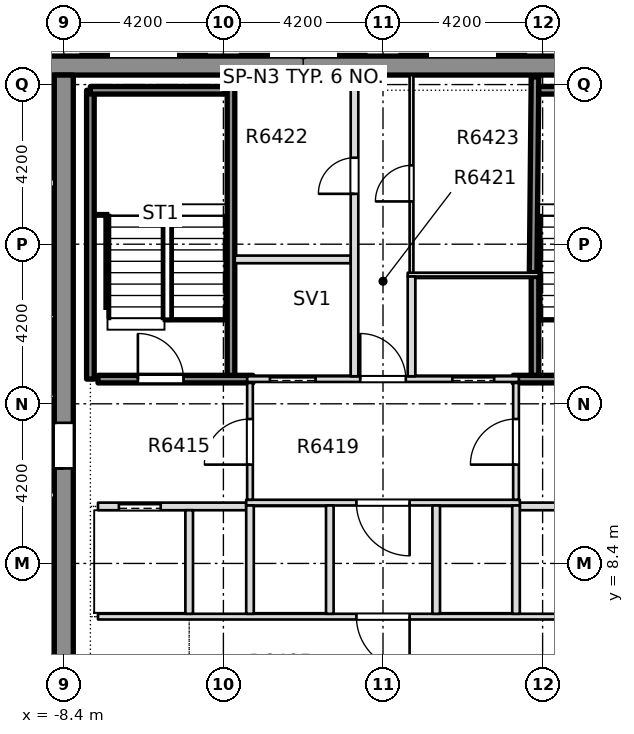
"""IFC4 building model, lengths in metres.
Left out: names, types, materials, properties, quantities, classifications, styles, units other than length and angle.
Written with IfcOpenShell. Run it as: python <this file> out.ifc"""

import sys

from ifc_helpers import new_model, si_unit, direction, frame, frame_2d, origin, place, context, subcontext, project, spatial, rectangle, extrude, element, fill, save


model = new_model("IFC4")
c1 = context("Model", 3, precision=1e-05, world=origin(), true_north=direction((0.0, 1.0)))
c2 = subcontext(c1, "Body", "Model", "MODEL_VIEW")
j1 = project(units=[si_unit("LENGTHUNIT", "METRE"), si_unit("PLANEANGLEUNIT", "RADIAN")], contexts=[c1])
p1 = place(None, origin())
s1 = spatial("IfcSite", under=j1, at=p1, CompositionType="ELEMENT")
p2 = place(p1, origin())
s2 = spatial("IfcBuilding", under=s1, at=p2, CompositionType="ELEMENT")
p3 = place(p2, frame((0.0, 0.0, 244.15)))
s3 = spatial("IfcBuildingStorey", under=s2, at=p3, CompositionType="ELEMENT", Elevation=244.15)
p4 = place(p3, frame((-12.1, 21.5, -0.4), z_axis=(0.0, 0.0, 1.0), x_axis=(1.0, 0.0, 0.0)))
e1 = element("IfcWall", 1, at=p4, inside=s3, PredefinedType="SHEAR", context=c2, shape_type="SweptSolid", body=[
    extrude(rectangle(XDim=24.2, YDim=0.5, at=frame_2d((12.1, 0.0))), origin(), (0.0, 0.0, 1.0), 3.45),
])
p5 = place(p3, frame((-8.4, -7.9, -0.4), z_axis=(0.0, 0.0, 1.0), x_axis=(0.0, 1.0, 0.0)))
e2 = element("IfcWall", 2, at=p5, inside=s3, PredefinedType="SHEAR", context=c2, shape_type="SweptSolid", body=[
    extrude(rectangle(XDim=29.15, YDim=0.5, at=frame_2d((14.575, 0.0))), origin(), (0.0, 0.0, 1.0), 3.45),
])
p6 = place(p5, frame((18.8, 0.0, 0.4)))
e3 = element("IfcOpeningElement", 3, at=p6, cuts=e2, PredefinedType="OPENING", context=c2, shape_type="SweptSolid", body=[
    extrude(rectangle(XDim=1.2, YDim=2.1, at=frame_2d((0.6, 1.05))), frame((0.0, 0.26, 0.0), z_axis=(0.0, -1.0, 0.0), x_axis=(1.0, 0.0, 0.0)), (0.0, 0.0, 1.0), 0.52),
])
p7 = place(p3, frame((-7.5, 7.0, 0.0), z_axis=(0.0, 0.0, 1.0), x_axis=(1.0, 0.0, 0.0)))
e4 = element("IfcWall", 4, at=p7, inside=s3, PredefinedType="PARTITIONING", context=c2, shape_type="SweptSolid", body=[
    extrude(rectangle(XDim=15.0, YDim=0.15, at=frame_2d((7.5, 0.0))), origin(), (0.0, 0.0, 1.0), 3.05),
])
p8 = place(p7, frame((6.8, 0.0, 0.0)))
e5 = element("IfcOpeningElement", 5, at=p8, cuts=e4, PredefinedType="OPENING", context=c2, shape_type="SweptSolid", body=[
    extrude(rectangle(XDim=1.4, YDim=2.1, at=frame_2d((0.7, 1.05))), frame((0.0, 0.085, 0.0), z_axis=(0.0, -1.0, 0.0), x_axis=(1.0, 0.0, 0.0)), (0.0, 0.0, 1.0), 0.17),
])
p9 = place(p3, frame((-7.5, 9.9, 0.0), z_axis=(0.0, 0.0, 1.0), x_axis=(1.0, 0.0, 0.0)))
e6 = element("IfcWall", 6, at=p9, inside=s3, PredefinedType="PARTITIONING", context=c2, shape_type="SweptSolid", body=[
    extrude(rectangle(XDim=3.9, YDim=0.2, at=frame_2d((1.95, 0.0))), origin(), (0.0, 0.0, 1.0), 3.05),
])
p10 = place(p9, frame((0.55, 0.0, 0.0)))
e7 = element("IfcOpeningElement", 7, at=p10, cuts=e6, PredefinedType="OPENING", context=c2, shape_type="SweptSolid", body=[
    extrude(rectangle(XDim=1.1, YDim=2.1, at=frame_2d((0.55, 1.05))), frame((0.0, 0.11, 0.0), z_axis=(0.0, -1.0, 0.0), x_axis=(1.0, 0.0, 0.0)), (0.0, 0.0, 1.0), 0.22),
])
p11 = place(p3, frame((3.6, 9.9, 0.0), z_axis=(0.0, 0.0, 1.0), x_axis=(1.0, 0.0, 0.0)))
e8 = element("IfcWall", 8, at=p11, inside=s3, PredefinedType="PARTITIONING", context=c2, shape_type="SweptSolid", body=[
    extrude(rectangle(XDim=3.9, YDim=0.2, at=frame_2d((1.95, 0.0))), origin(), (0.0, 0.0, 1.0), 3.05),
])
p12 = place(p11, frame((2.25, 0.0, 0.0)))
e9 = element("IfcOpeningElement", 9, at=p12, cuts=e8, PredefinedType="OPENING", context=c2, shape_type="SweptSolid", body=[
    extrude(rectangle(XDim=1.1, YDim=2.1, at=frame_2d((0.55, 1.05))), frame((0.0, 0.11, 0.0), z_axis=(0.0, -1.0, 0.0), x_axis=(1.0, 0.0, 0.0)), (0.0, 0.0, 1.0), 0.22),
])
p13 = place(p3, frame((-3.6, 10.0, 0.0), z_axis=(0.0, 0.0, 1.0), x_axis=(1.0, 0.0, 0.0)))
e10 = element("IfcWall", 10, at=p13, inside=s3, PredefinedType="PARTITIONING", context=c2, shape_type="SweptSolid", body=[
    extrude(rectangle(XDim=7.2, YDim=0.15, at=frame_2d((3.6, 0.0))), origin(), (0.0, 0.0, 1.0), 3.05),
])
p14 = place(p13, frame((2.9, 0.0, 0.0)))
e11 = element("IfcOpeningElement", 11, at=p14, cuts=e10, PredefinedType="OPENING", context=c2, shape_type="SweptSolid", body=[
    extrude(rectangle(XDim=1.4, YDim=2.1, at=frame_2d((0.7, 1.05))), frame((0.0, 0.085, 0.0), z_axis=(0.0, -1.0, 0.0), x_axis=(1.0, 0.0, 0.0)), (0.0, 0.0, 1.0), 0.17),
])
p15 = place(p3, frame((-7.5, 13.25, 0.0), z_axis=(0.0, 0.0, 1.0), x_axis=(1.0, 0.0, 0.0)))
e12 = element("IfcWall", 12, at=p15, inside=s3, PredefinedType="SOLIDWALL", context=c2, shape_type="SweptSolid", body=[
    extrude(rectangle(XDim=4.075, YDim=0.2, at=frame_2d((2.038, 0.0))), origin(), (0.0, 0.0, 1.0), 3.05),
])
p16 = place(p15, frame((1.05, 0.0, 0.0)))
e13 = element("IfcOpeningElement", 13, at=p16, cuts=e12, PredefinedType="OPENING", context=c2, shape_type="SweptSolid", body=[
    extrude(rectangle(XDim=1.2, YDim=2.1, at=frame_2d((0.6, 1.05))), frame((0.0, 0.11, 0.0), z_axis=(0.0, -1.0, 0.0), x_axis=(1.0, 0.0, 0.0)), (0.0, 0.0, 1.0), 0.22),
])
p17 = place(p3, frame((-3.575, 13.25, 0.0), z_axis=(0.0, 0.0, 1.0), x_axis=(1.0, 0.0, 0.0)))
e14 = element("IfcWall", 14, at=p17, inside=s3, PredefinedType="PARTITIONING", context=c2, shape_type="SweptSolid", body=[
    extrude(rectangle(XDim=7.15, YDim=0.15, at=frame_2d((3.575, 0.0))), origin(), (0.0, 0.0, 1.0), 3.05),
])
p18 = place(p17, frame((0.6, 0.0, 0.0)))
e15 = element("IfcOpeningElement", 15, at=p18, cuts=e14, PredefinedType="OPENING", context=c2, shape_type="SweptSolid", body=[
    extrude(rectangle(XDim=1.2, YDim=2.1, at=frame_2d((0.6, 1.05))), frame((0.0, 0.085, 0.0), z_axis=(0.0, -1.0, 0.0), x_axis=(1.0, 0.0, 0.0)), (0.0, 0.0, 1.0), 0.17),
])
p19 = place(p17, frame((5.4, 0.0, 0.0)))
e16 = element("IfcOpeningElement", 16, at=p19, cuts=e14, PredefinedType="OPENING", context=c2, shape_type="SweptSolid", body=[
    extrude(rectangle(XDim=1.1, YDim=2.1, at=frame_2d((0.55, 1.05))), frame((0.0, 0.085, 0.0), z_axis=(0.0, -1.0, 0.0), x_axis=(1.0, 0.0, 0.0)), (0.0, 0.0, 1.0), 0.17),
])
p20 = place(p17, frame((2.975, 0.0, 0.0)))
e17 = element("IfcOpeningElement", 17, at=p20, cuts=e14, PredefinedType="OPENING", context=c2, shape_type="SweptSolid", body=[
    extrude(rectangle(XDim=1.2, YDim=2.1, at=frame_2d((0.6, 1.05))), frame((0.0, 0.085, 0.0), z_axis=(0.0, -1.0, 0.0), x_axis=(1.0, 0.0, 0.0)), (0.0, 0.0, 1.0), 0.17),
])
p21 = place(p3, frame((3.425, 13.25, 0.0), z_axis=(0.0, 0.0, 1.0), x_axis=(1.0, 0.0, 0.0)))
e18 = element("IfcWall", 18, at=p21, inside=s3, PredefinedType="SOLIDWALL", context=c2, shape_type="SweptSolid", body=[
    extrude(rectangle(XDim=4.075, YDim=0.2, at=frame_2d((2.038, 0.0))), origin(), (0.0, 0.0, 1.0), 3.05),
])
p22 = place(p21, frame((1.825, 0.0, 0.0)))
e19 = element("IfcOpeningElement", 19, at=p22, cuts=e18, PredefinedType="OPENING", context=c2, shape_type="SweptSolid", body=[
    extrude(rectangle(XDim=1.2, YDim=2.1, at=frame_2d((0.6, 1.05))), frame((0.0, 0.11, 0.0), z_axis=(0.0, -1.0, 0.0), x_axis=(1.0, 0.0, 0.0)), (0.0, 0.0, 1.0), 0.22),
])
p23 = place(p3, frame((0.65, 16.0, 0.0), z_axis=(0.0, 0.0, 1.0), x_axis=(1.0, 0.0, 0.0)))
e20 = element("IfcWall", 20, at=p23, inside=s3, PredefinedType="PARTITIONING", context=c2, shape_type="SweptSolid", body=[
    extrude(rectangle(XDim=3.45, YDim=0.1, at=frame_2d((1.725, 0.0))), origin(), (0.0, 0.0, 1.0), 3.05),
])
p24 = place(p3, frame((-3.9, 16.4, 0.0), z_axis=(0.0, 0.0, 1.0), x_axis=(1.0, 0.0, 0.0)))
e21 = element("IfcWall", 21, at=p24, inside=s3, PredefinedType="PARTITIONING", context=c2, shape_type="SweptSolid", body=[
    extrude(rectangle(XDim=3.05, YDim=0.2, at=frame_2d((1.525, 0.0))), origin(), (0.0, 0.0, 1.0), 3.05),
])
p25 = place(p3, frame((-5.1, 7.075, 0.0), z_axis=(0.0, 0.0, 1.0), x_axis=(0.0, 1.0, 0.0)))
e22 = element("IfcWall", 22, at=p25, inside=s3, PredefinedType="PARTITIONING", context=c2, shape_type="SweptSolid", body=[
    extrude(rectangle(XDim=2.725, YDim=0.2, at=frame_2d((1.363, 0.0))), origin(), (0.0, 0.0, 1.0), 3.05),
])
p26 = place(p3, frame((-4.0, 13.35, 0.0), z_axis=(0.0, 0.0, 1.0), x_axis=(0.0, 1.0, 0.0)))
e23 = element("IfcWall", 23, at=p26, inside=s3, PredefinedType="SOLIDWALL", context=c2, shape_type="SweptSolid", body=[
    extrude(rectangle(XDim=7.899, YDim=0.2, at=frame_2d((3.949, 0.0))), origin(), (0.0, 0.0, 1.0), 3.05),
])
p27 = place(p3, frame((-3.5, 7.075, 0.0), z_axis=(0.0, 0.0, 1.0), x_axis=(0.0, 1.0, 0.0)))
e24 = element("IfcWall", 24, at=p27, inside=s3, PredefinedType="PARTITIONING", context=c2, shape_type="SweptSolid", body=[
    extrude(rectangle(XDim=2.85, YDim=0.2, at=frame_2d((1.425, 0.0))), origin(), (0.0, 0.0, 1.0), 3.05),
])
p28 = place(p3, frame((-3.5, 10.075, 0.0), z_axis=(0.0, 0.0, 1.0), x_axis=(0.0, 1.0, 0.0)))
e25 = element("IfcWall", 25, at=p28, inside=s3, PredefinedType="PARTITIONING", context=c2, shape_type="SweptSolid", body=[
    extrude(rectangle(XDim=3.075, YDim=0.15, at=frame_2d((1.538, 0.0))), origin(), (0.0, 0.0, 1.0), 3.05),
])
p29 = place(p28, frame((0.925, 0.0, 0.0)))
e26 = element("IfcOpeningElement", 26, at=p29, cuts=e25, PredefinedType="OPENING", context=c2, shape_type="SweptSolid", body=[
    extrude(rectangle(XDim=1.2, YDim=2.1, at=frame_2d((0.6, 1.05))), frame((0.0, 0.085, 0.0), z_axis=(0.0, -1.0, 0.0), x_axis=(1.0, 0.0, 0.0)), (0.0, 0.0, 1.0), 0.17),
])
p30 = place(p3, frame((-1.4, 7.075, 0.0), z_axis=(0.0, 0.0, 1.0), x_axis=(0.0, 1.0, 0.0)))
e27 = element("IfcWall", 27, at=p30, inside=s3, PredefinedType="PARTITIONING", context=c2, shape_type="SweptSolid", body=[
    extrude(rectangle(XDim=2.85, YDim=0.2, at=frame_2d((1.425, 0.0))), origin(), (0.0, 0.0, 1.0), 3.05),
])
p31 = place(p3, frame((-0.75, 13.325, 0.0), z_axis=(0.0, 0.0, 1.0), x_axis=(0.0, 1.0, 0.0)))
e28 = element("IfcWall", 28, at=p31, inside=s3, PredefinedType="PARTITIONING", context=c2, shape_type="SweptSolid", body=[
    extrude(rectangle(XDim=7.924, YDim=0.2, at=frame_2d((3.962, 0.0))), origin(), (0.0, 0.0, 1.0), 3.05),
])
p32 = place(p31, frame((4.8, 0.0, 0.0)))
e29 = element("IfcOpeningElement", 29, at=p32, cuts=e28, PredefinedType="OPENING", context=c2, shape_type="SweptSolid", body=[
    extrude(rectangle(XDim=0.95, YDim=2.1, at=frame_2d((0.475, 1.05))), frame((0.0, 0.11, 0.0), z_axis=(0.0, -1.0, 0.0), x_axis=(1.0, 0.0, 0.0)), (0.0, 0.0, 1.0), 0.22),
])
p33 = place(p3, frame((0.75, 13.325, 0.0), z_axis=(0.0, 0.0, 1.0), x_axis=(0.0, 1.0, 0.0)))
e30 = element("IfcWall", 30, at=p33, inside=s3, PredefinedType="PARTITIONING", context=c2, shape_type="SweptSolid", body=[
    extrude(rectangle(XDim=2.625, YDim=0.2, at=frame_2d((1.312, 0.0))), origin(), (0.0, 0.0, 1.0), 3.05),
])
p34 = place(p3, frame((0.75, 16.05, 0.0), z_axis=(0.0, 0.0, 1.0), x_axis=(0.0, 1.0, 0.0)))
e31 = element("IfcWall", 31, at=p34, inside=s3, PredefinedType="PARTITIONING", context=c2, shape_type="SweptSolid", body=[
    extrude(rectangle(XDim=5.199, YDim=0.1, at=frame_2d((2.6, 0.0))), origin(), (0.0, 0.0, 1.0), 3.05),
])
p35 = place(p34, frame((1.875, 0.0, 0.0)))
e32 = element("IfcOpeningElement", 32, at=p35, cuts=e31, PredefinedType="OPENING", context=c2, shape_type="SweptSolid", body=[
    extrude(rectangle(XDim=0.95, YDim=2.1, at=frame_2d((0.475, 1.05))), frame((0.0, 0.06, 0.0), z_axis=(0.0, -1.0, 0.0), x_axis=(1.0, 0.0, 0.0)), (0.0, 0.0, 1.0), 0.12),
])
for number, where, z_axis, x_axis in (
    (33, (1.4, 7.075, 0.0), (0.0, 0.0, 1.0), (0.0, 1.0, 0.0)),
    (34, (3.5, 7.075, 0.0), (0.0, 0.0, 1.0), (0.0, 1.0, 0.0)),
):
    element("IfcWall", number, at=place(p3, frame(where, z_axis=z_axis, x_axis=x_axis)), inside=s3, PredefinedType="PARTITIONING", context=c2, shape_type="SweptSolid", body=[
        extrude(rectangle(XDim=2.85, YDim=0.2, at=frame_2d((1.425, 0.0))), origin(), (0.0, 0.0, 1.0), 3.05),
    ])
p36 = place(p3, frame((3.5, 10.075, 0.0), z_axis=(0.0, 0.0, 1.0), x_axis=(0.0, 1.0, 0.0)))
e35 = element("IfcWall", 35, at=p36, inside=s3, PredefinedType="PARTITIONING", context=c2, shape_type="SweptSolid", body=[
    extrude(rectangle(XDim=3.075, YDim=0.15, at=frame_2d((1.538, 0.0))), origin(), (0.0, 0.0, 1.0), 3.05),
])
p37 = place(p36, frame((0.925, 0.0, 0.0)))
e36 = element("IfcOpeningElement", 36, at=p37, cuts=e35, PredefinedType="OPENING", context=c2, shape_type="SweptSolid", body=[
    extrude(rectangle(XDim=1.2, YDim=2.1, at=frame_2d((0.6, 1.05))), frame((0.0, 0.085, 0.0), z_axis=(0.0, -1.0, 0.0), x_axis=(1.0, 0.0, 0.0)), (0.0, 0.0, 1.0), 0.17),
])
p38 = place(p3, frame((4.0, 13.35, 0.0), z_axis=(0.0, 0.0, 1.0), x_axis=(0.0, 1.0, 0.0)))
e37 = element("IfcWall", 37, at=p38, inside=s3, PredefinedType="SOLIDWALL", context=c2, shape_type="SweptSolid", body=[
    extrude(rectangle(XDim=2.6, YDim=0.2, at=frame_2d((1.3, 0.0))), origin(), (0.0, 0.0, 1.0), 3.05),
])
p39 = place(p3, frame((3.95, 16.05, 0.0), z_axis=(0.0, 0.0, 1.0), x_axis=(0.009719787395, 0.999952761751, 0.0)))
e38 = element("IfcWall", 38, at=p39, inside=s3, PredefinedType="SOLIDWALL", context=c2, shape_type="SweptSolid", body=[
    extrude(rectangle(XDim=5.149, YDim=0.2, at=frame_2d((2.575, 0.0))), origin(), (0.0, 0.0, 1.0), 3.05),
])
p40 = place(p3, frame((-12.099, 10.2, 0.0), z_axis=(0.0, 0.0, 1.0), x_axis=(1.0, 0.0, 0.0)))
e39 = element("IfcWall", 39, at=p40, inside=s3, PredefinedType="PARTITIONING", context=c2, shape_type="SweptSolid", body=[
    extrude(rectangle(XDim=3.448, YDim=0.15, at=frame_2d((1.724, 0.0))), origin(), (0.0, 0.0, 1.0), 3.05),
])
for number, where, z_axis, x_axis in (
    (40, (-12.099, 12.8, 0.0), (0.0, 0.0, 1.0), (1.0, 0.0, 0.0)),
    (41, (-12.099, 14.891, 0.0), (0.0, 0.0, 1.0), (1.0, 0.0, 0.0)),
):
    element("IfcWall", number, at=place(p3, frame(where, z_axis=z_axis, x_axis=x_axis)), inside=s3, PredefinedType="PARTITIONING", context=c2, shape_type="SweptSolid", body=[
        extrude(rectangle(XDim=3.448, YDim=0.1, at=frame_2d((1.724, 0.0))), origin(), (0.0, 0.0, 1.0), 3.05),
    ])
p41 = place(p3, frame((-12.099, 18.411, 0.0), z_axis=(0.0, 0.0, 1.0), x_axis=(1.0, 0.0, 0.0)))
e42 = element("IfcWall", 42, at=p41, inside=s3, PredefinedType="PARTITIONING", context=c2, shape_type="SweptSolid", body=[
    extrude(rectangle(XDim=3.448, YDim=0.2, at=frame_2d((1.724, 0.0))), origin(), (0.0, 0.0, 1.0), 3.05),
])
p42 = place(p3, frame((-7.7, 13.25, 0.0), z_axis=(0.0, 0.0, 1.0), x_axis=(0.0, 1.0, 0.0)))
e43 = element("IfcWall", 43, at=p42, inside=s3, PredefinedType="SOLIDWALL", context=c2, shape_type="SweptSolid", body=[
    extrude(rectangle(XDim=7.6, YDim=0.2, at=frame_2d((3.8, 0.0))), origin(), (0.0, 0.0, 1.0), 3.05),
])
p43 = place(p3, frame((-7.7, 20.85, 0.0), z_axis=(0.0, 0.0, 1.0), x_axis=(1.0, 0.0, 0.0)))
e44 = element("IfcWall", 44, at=p43, inside=s3, PredefinedType="SOLIDWALL", context=c2, shape_type="SweptSolid", body=[
    extrude(rectangle(XDim=3.55, YDim=0.2, at=frame_2d((1.775, 0.0))), origin(), (0.0, 0.0, 1.0), 3.05),
])
p44 = place(p3, frame((4.1, 20.85, 0.0), z_axis=(0.0, 0.0, 1.0), x_axis=(1.0, 0.0, 0.0)))
e45 = element("IfcWall", 45, at=p44, inside=s3, PredefinedType="SOLIDWALL", context=c2, shape_type="SweptSolid", body=[
    extrude(rectangle(XDim=3.6, YDim=0.2, at=frame_2d((1.8, 0.0))), origin(), (0.0, 0.0, 1.0), 3.05),
])
p45 = place(p16, origin())
e46 = element("IfcDoor", 46, at=p45, inside=s3, OperationType="SINGLE_SWING_LEFT", PredefinedType="DOOR", context=c2, shape_type="SweptSolid", body=[
    extrude(rectangle(XDim=1.2, YDim=2.1, at=frame_2d((0.6, 1.05))), frame((0.0, 0.025, 0.0), z_axis=(0.0, -1.0, 0.0), x_axis=(1.0, 0.0, 0.0)), (0.0, 0.0, 1.0), 0.05),
])
fill(e13, e46)
p46 = place(p10, origin())
e47 = element("IfcDoor", 47, at=p46, inside=s3, OperationType="SLIDING_TO_RIGHT", PredefinedType="DOOR", context=c2, shape_type="SweptSolid", body=[
    extrude(rectangle(XDim=1.1, YDim=2.1, at=frame_2d((0.55, 1.05))), frame((0.0, 0.025, 0.0), z_axis=(0.0, -1.0, 0.0), x_axis=(1.0, 0.0, 0.0)), (0.0, 0.0, 1.0), 0.05),
])
fill(e7, e47)
p47 = place(p8, origin())
e48 = element("IfcDoor", 48, at=p47, inside=s3, OperationType="SINGLE_SWING_RIGHT", PredefinedType="DOOR", context=c2, shape_type="SweptSolid", body=[
    extrude(rectangle(XDim=1.4, YDim=2.1, at=frame_2d((0.7, 1.05))), frame((0.0, 0.025, 0.0), z_axis=(0.0, -1.0, 0.0), x_axis=(1.0, 0.0, 0.0)), (0.0, 0.0, 1.0), 0.05),
])
fill(e5, e48)
p48 = place(p14, origin())
e49 = element("IfcDoor", 49, at=p48, inside=s3, OperationType="SINGLE_SWING_RIGHT", PredefinedType="DOOR", context=c2, shape_type="SweptSolid", body=[
    extrude(rectangle(XDim=1.4, YDim=2.1, at=frame_2d((0.7, 1.05))), frame((0.0, 0.025, 0.0), z_axis=(0.0, -1.0, 0.0), x_axis=(1.0, 0.0, 0.0)), (0.0, 0.0, 1.0), 0.05),
])
fill(e11, e49)
p49 = place(p18, origin())
e50 = element("IfcDoor", 50, at=p49, inside=s3, OperationType="SLIDING_TO_RIGHT", PredefinedType="DOOR", context=c2, shape_type="SweptSolid", body=[
    extrude(rectangle(XDim=1.2, YDim=2.1, at=frame_2d((0.6, 1.05))), frame((0.0, 0.025, 0.0), z_axis=(0.0, -1.0, 0.0), x_axis=(1.0, 0.0, 0.0)), (0.0, 0.0, 1.0), 0.05),
])
fill(e15, e50)
p50 = place(p19, origin())
e51 = element("IfcDoor", 51, at=p50, inside=s3, OperationType="SLIDING_TO_LEFT", PredefinedType="DOOR", context=c2, shape_type="SweptSolid", body=[
    extrude(rectangle(XDim=1.1, YDim=2.1, at=frame_2d((0.55, 1.05))), frame((0.0, 0.025, 0.0), z_axis=(0.0, -1.0, 0.0), x_axis=(1.0, 0.0, 0.0)), (0.0, 0.0, 1.0), 0.05),
])
fill(e16, e51)
p51 = place(p20, origin())
e52 = element("IfcDoor", 52, at=p51, inside=s3, OperationType="SINGLE_SWING_RIGHT", PredefinedType="DOOR", context=c2, shape_type="SweptSolid", body=[
    extrude(rectangle(XDim=1.2, YDim=2.1, at=frame_2d((0.6, 1.05))), frame((0.0, 0.025, 0.0), z_axis=(0.0, -1.0, 0.0), x_axis=(1.0, 0.0, 0.0)), (0.0, 0.0, 1.0), 0.05),
])
fill(e17, e52)
p52 = place(p32, origin())
e53 = element("IfcDoor", 53, at=p52, inside=s3, OperationType="SINGLE_SWING_RIGHT", PredefinedType="DOOR", context=c2, shape_type="SweptSolid", body=[
    extrude(rectangle(XDim=0.95, YDim=2.1, at=frame_2d((0.475, 1.05))), frame((0.0, 0.025, 0.0), z_axis=(0.0, -1.0, 0.0), x_axis=(1.0, 0.0, 0.0)), (0.0, 0.0, 1.0), 0.05),
])
fill(e29, e53)
p53 = place(p35, origin())
e54 = element("IfcDoor", 54, at=p53, inside=s3, OperationType="SINGLE_SWING_LEFT", PredefinedType="DOOR", context=c2, shape_type="SweptSolid", body=[
    extrude(rectangle(XDim=0.95, YDim=2.1, at=frame_2d((0.475, 1.05))), frame((0.0, 0.025, 0.0), z_axis=(0.0, -1.0, 0.0), x_axis=(1.0, 0.0, 0.0)), (0.0, 0.0, 1.0), 0.05),
])
fill(e32, e54)
p54 = place(p29, origin())
e55 = element("IfcDoor", 55, at=p54, inside=s3, OperationType="SINGLE_SWING_RIGHT", PredefinedType="DOOR", context=c2, shape_type="SweptSolid", body=[
    extrude(rectangle(XDim=1.2, YDim=2.1, at=frame_2d((0.6, 1.05))), frame((0.0, 0.025, 0.0), z_axis=(0.0, -1.0, 0.0), x_axis=(1.0, 0.0, 0.0)), (0.0, 0.0, 1.0), 0.05),
])
fill(e26, e55)
p55 = place(p37, origin())
e56 = element("IfcDoor", 56, at=p55, inside=s3, OperationType="SINGLE_SWING_LEFT", PredefinedType="DOOR", context=c2, shape_type="SweptSolid", body=[
    extrude(rectangle(XDim=1.2, YDim=2.1, at=frame_2d((0.6, 1.05))), frame((0.0, 0.025, 0.0), z_axis=(0.0, -1.0, 0.0), x_axis=(1.0, 0.0, 0.0)), (0.0, 0.0, 1.0), 0.05),
])
fill(e36, e56)
p56 = place(p6, origin())
e57 = element("IfcDoor", 57, at=p56, inside=s3, OperationType="SINGLE_SWING_LEFT", PredefinedType="DOOR", context=c2, shape_type="SweptSolid", body=[
    extrude(rectangle(XDim=1.2, YDim=2.1, at=frame_2d((0.6, 1.05))), frame((0.0, 0.025, 0.0), z_axis=(0.0, -1.0, 0.0), x_axis=(1.0, 0.0, 0.0)), (0.0, 0.0, 1.0), 0.05),
])
fill(e3, e57)
save(model, sys.argv[1])
